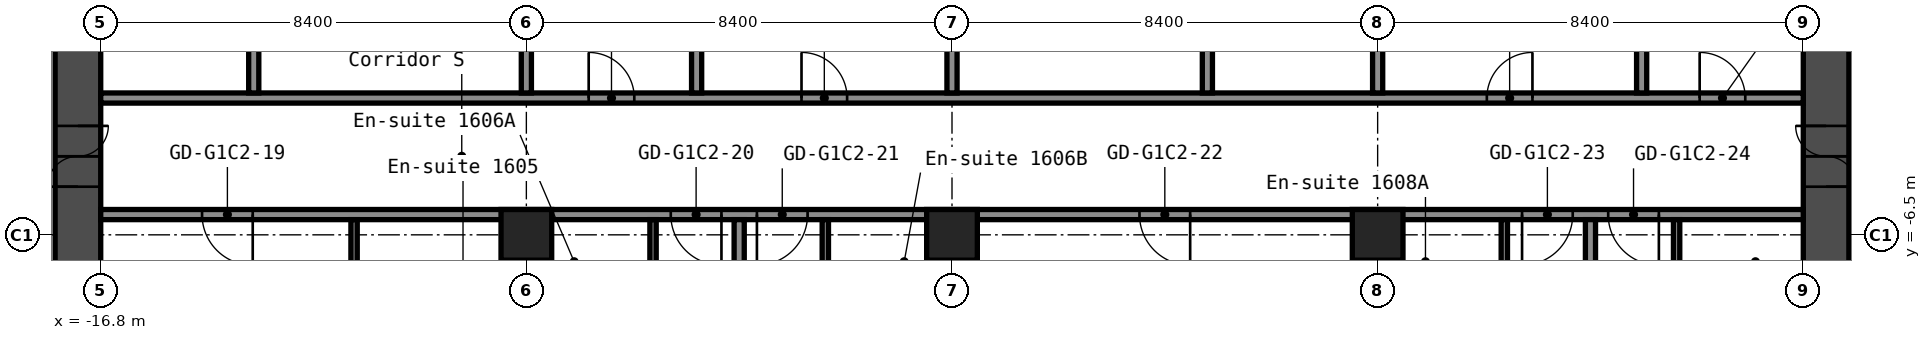
"""IFC4 building model, lengths in metres.
Left out: names, types, materials, properties, quantities, classifications, styles, units other than length and angle.
Written with IfcOpenShell. Run it as: python <this file> out.ifc"""

import sys

from ifc_helpers import new_model, si_unit, direction, frame, frame_2d, origin, origin_2d, place, context, subcontext, project, spatial, rectangle, hollow_rectangle, extrude, element, fill, save


model = new_model("IFC4")
c1 = context("Model", 3, precision=1e-05, world=origin(), true_north=direction((0.0, 1.0)))
c2 = subcontext(c1, "Body", "Model", "MODEL_VIEW")
j1 = project(units=[si_unit("LENGTHUNIT", "METRE"), si_unit("PLANEANGLEUNIT", "RADIAN")], contexts=[c1])
p1 = place(None, origin())
s1 = spatial("IfcSite", under=j1, at=p1, CompositionType="ELEMENT")
p2 = place(p1, origin())
s2 = spatial("IfcBuilding", under=s1, at=p2, CompositionType="ELEMENT")
p3 = place(p2, frame((0.0, 0.0, 58.2)))
s3 = spatial("IfcBuildingStorey", under=s2, at=p3, CompositionType="ELEMENT", Elevation=58.2)
for number, where, z_axis, x_axis in (
    (1, (-8.4, -6.5, 0.0), (0.0, 0.0, 1.0), (1.0, 0.0, 0.0)),
    (2, (0.0, -6.5, 0.0), (0.0, 0.0, 1.0), (1.0, 0.0, 0.0)),
    (3, (8.4, -6.5, 0.0), (0.0, 0.0, 1.0), (1.0, 0.0, 0.0)),
):
    element("IfcColumn", number, at=place(p3, frame(where, z_axis=z_axis, x_axis=x_axis)), inside=s3, PredefinedType="COLUMN", context=c2, shape_type="SweptSolid", body=[
        extrude(hollow_rectangle(XDim=1.0, YDim=1.0, WallThickness=0.04, at=origin_2d()), origin(), (0.0, 0.0, 1.0), 2.8),
    ])
p4 = place(p3, frame((-17.25, -8.4, 0.0), z_axis=(0.0, 0.0, 1.0), x_axis=(0.0, 1.0, 0.0)))
e4 = element("IfcWall", 4, at=p4, inside=s3, PredefinedType="SHEAR", context=c2, shape_type="SweptSolid", body=[
    extrude(rectangle(XDim=16.8, YDim=0.9, at=frame_2d((8.4, 0.0))), origin(), (0.0, 0.0, 1.0), 2.8),
])
p5 = place(p4, frame((12.75, 0.0, 0.0)))
e5 = element("IfcOpeningElement", 5, at=p5, cuts=e4, PredefinedType="OPENING", context=c2, shape_type="SweptSolid", body=[
    extrude(rectangle(XDim=1.2, YDim=2.1, at=frame_2d((0.6, 1.05))), frame((0.0, 0.46, 0.0), z_axis=(0.0, -1.0, 0.0), x_axis=(1.0, 0.0, 0.0)), (0.0, 0.0, 1.0), 0.92),
])
p6 = place(p4, frame((2.85, 0.0, 0.0)))
e6 = element("IfcOpeningElement", 6, at=p6, cuts=e4, PredefinedType="OPENING", context=c2, shape_type="SweptSolid", body=[
    extrude(rectangle(XDim=1.2, YDim=2.1, at=frame_2d((0.6, 1.05))), frame((0.0, 0.46, 0.0), z_axis=(0.0, -1.0, 0.0), x_axis=(1.0, 0.0, 0.0)), (0.0, 0.0, 1.0), 0.92),
])
p7 = place(p3, frame((17.25, -8.4, 0.0), z_axis=(0.0, 0.0, 1.0), x_axis=(0.0, 1.0, 0.0)))
e7 = element("IfcWall", 7, at=p7, inside=s3, PredefinedType="SHEAR", context=c2, shape_type="SweptSolid", body=[
    extrude(rectangle(XDim=16.8, YDim=0.9, at=frame_2d((8.4, 0.0))), origin(), (0.0, 0.0, 1.0), 2.8),
])
p8 = place(p7, frame((12.75, 0.0, 0.0)))
e8 = element("IfcOpeningElement", 8, at=p8, cuts=e7, PredefinedType="OPENING", context=c2, shape_type="SweptSolid", body=[
    extrude(rectangle(XDim=1.2, YDim=2.1, at=frame_2d((0.6, 1.05))), frame((0.0, 0.46, 0.0), z_axis=(0.0, -1.0, 0.0), x_axis=(1.0, 0.0, 0.0)), (0.0, 0.0, 1.0), 0.92),
])
p9 = place(p7, frame((2.85, 0.0, 0.0)))
e9 = element("IfcOpeningElement", 9, at=p9, cuts=e7, PredefinedType="OPENING", context=c2, shape_type="SweptSolid", body=[
    extrude(rectangle(XDim=1.2, YDim=2.1, at=frame_2d((0.6, 1.05))), frame((0.0, 0.46, 0.0), z_axis=(0.0, -1.0, 0.0), x_axis=(1.0, 0.0, 0.0)), (0.0, 0.0, 1.0), 0.92),
])
p10 = place(p3, frame((-16.8, -6.1, 0.0), z_axis=(0.0, 0.0, 1.0), x_axis=(1.0, 0.0, 0.0)))
e10 = element("IfcWall", 10, at=p10, inside=s3, PredefinedType="PARTITIONING", context=c2, shape_type="SweptSolid", body=[
    extrude(rectangle(XDim=33.6, YDim=0.2, at=frame_2d((16.8, 0.0))), origin(), (0.0, 0.0, 1.0), 2.8),
])
p11 = place(p10, frame((2.0, 0.0, 0.0)))
e11 = element("IfcOpeningElement", 11, at=p11, cuts=e10, PredefinedType="OPENING", context=c2, shape_type="SweptSolid", body=[
    extrude(rectangle(XDim=1.0, YDim=2.1, at=frame_2d((0.5, 1.05))), frame((0.0, 0.11, 0.0), z_axis=(0.0, -1.0, 0.0), x_axis=(1.0, 0.0, 0.0)), (0.0, 0.0, 1.0), 0.22),
])
p12 = place(p10, frame((11.25, 0.0, 0.0)))
e12 = element("IfcOpeningElement", 12, at=p12, cuts=e10, PredefinedType="OPENING", context=c2, shape_type="SweptSolid", body=[
    extrude(rectangle(XDim=1.0, YDim=2.1, at=frame_2d((0.5, 1.05))), frame((0.0, 0.11, 0.0), z_axis=(0.0, -1.0, 0.0), x_axis=(1.0, 0.0, 0.0)), (0.0, 0.0, 1.0), 0.22),
])
p13 = place(p10, frame((12.95, 0.0, 0.0)))
e13 = element("IfcOpeningElement", 13, at=p13, cuts=e10, PredefinedType="OPENING", context=c2, shape_type="SweptSolid", body=[
    extrude(rectangle(XDim=1.0, YDim=2.1, at=frame_2d((0.5, 1.05))), frame((0.0, 0.11, 0.0), z_axis=(0.0, -1.0, 0.0), x_axis=(1.0, 0.0, 0.0)), (0.0, 0.0, 1.0), 0.22),
])
p14 = place(p10, frame((20.5, 0.0, 0.0)))
e14 = element("IfcOpeningElement", 14, at=p14, cuts=e10, PredefinedType="OPENING", context=c2, shape_type="SweptSolid", body=[
    extrude(rectangle(XDim=1.0, YDim=2.1, at=frame_2d((0.5, 1.05))), frame((0.0, 0.11, 0.0), z_axis=(0.0, -1.0, 0.0), x_axis=(1.0, 0.0, 0.0)), (0.0, 0.0, 1.0), 0.22),
])
p15 = place(p10, frame((28.05, 0.0, 0.0)))
e15 = element("IfcOpeningElement", 15, at=p15, cuts=e10, PredefinedType="OPENING", context=c2, shape_type="SweptSolid", body=[
    extrude(rectangle(XDim=1.0, YDim=2.1, at=frame_2d((0.5, 1.05))), frame((0.0, 0.11, 0.0), z_axis=(0.0, -1.0, 0.0), x_axis=(1.0, 0.0, 0.0)), (0.0, 0.0, 1.0), 0.22),
])
p16 = place(p10, frame((29.75, 0.0, 0.0)))
e16 = element("IfcOpeningElement", 16, at=p16, cuts=e10, PredefinedType="OPENING", context=c2, shape_type="SweptSolid", body=[
    extrude(rectangle(XDim=1.0, YDim=2.1, at=frame_2d((0.5, 1.05))), frame((0.0, 0.11, 0.0), z_axis=(0.0, -1.0, 0.0), x_axis=(1.0, 0.0, 0.0)), (0.0, 0.0, 1.0), 0.22),
])
p17 = place(p3, frame((-16.8, -3.8, 0.0), z_axis=(0.0, 0.0, 1.0), x_axis=(1.0, 0.0, 0.0)))
e17 = element("IfcWall", 17, at=p17, inside=s3, PredefinedType="PARTITIONING", context=c2, shape_type="SweptSolid", body=[
    extrude(rectangle(XDim=33.6, YDim=0.2, at=frame_2d((16.8, 0.0))), origin(), (0.0, 0.0, 1.0), 2.8),
])
p18 = place(p17, frame((9.63, 0.0, 0.0)))
e18 = element("IfcOpeningElement", 18, at=p18, cuts=e17, PredefinedType="OPENING", context=c2, shape_type="SweptSolid", body=[
    extrude(rectangle(XDim=0.9, YDim=2.1, at=frame_2d((0.45, 1.05))), frame((0.0, 0.11, 0.0), z_axis=(0.0, -1.0, 0.0), x_axis=(1.0, 0.0, 0.0)), (0.0, 0.0, 1.0), 0.22),
])
p19 = place(p17, frame((13.83, 0.0, 0.0)))
e19 = element("IfcOpeningElement", 19, at=p19, cuts=e17, PredefinedType="OPENING", context=c2, shape_type="SweptSolid", body=[
    extrude(rectangle(XDim=0.9, YDim=2.1, at=frame_2d((0.45, 1.05))), frame((0.0, 0.11, 0.0), z_axis=(0.0, -1.0, 0.0), x_axis=(1.0, 0.0, 0.0)), (0.0, 0.0, 1.0), 0.22),
])
p20 = place(p17, frame((27.355, 0.0, 0.0)))
e20 = element("IfcOpeningElement", 20, at=p20, cuts=e17, PredefinedType="OPENING", context=c2, shape_type="SweptSolid", body=[
    extrude(rectangle(XDim=0.9, YDim=2.1, at=frame_2d((0.45, 1.05))), frame((0.0, 0.11, 0.0), z_axis=(0.0, -1.0, 0.0), x_axis=(1.0, 0.0, 0.0)), (0.0, 0.0, 1.0), 0.22),
])
p21 = place(p17, frame((31.555, 0.0, 0.0)))
e21 = element("IfcOpeningElement", 21, at=p21, cuts=e17, PredefinedType="OPENING", context=c2, shape_type="SweptSolid", body=[
    extrude(rectangle(XDim=0.9, YDim=2.1, at=frame_2d((0.45, 1.05))), frame((0.0, 0.11, 0.0), z_axis=(0.0, -1.0, 0.0), x_axis=(1.0, 0.0, 0.0)), (0.0, 0.0, 1.0), 0.22),
])
p22 = place(p3, frame((-13.78, -3.7, 0.0), z_axis=(0.0, 0.0, 1.0), x_axis=(0.0, 1.0, 0.0)))
e22 = element("IfcWall", 22, at=p22, inside=s3, PredefinedType="PARTITIONING", context=c2, shape_type="SweptSolid", body=[
    extrude(rectangle(XDim=7.4, YDim=0.2, at=frame_2d((3.7, 0.0))), origin(), (0.0, 0.0, 1.0), 2.8),
])
p23 = place(p3, frame((-11.8, -9.5, 0.0), z_axis=(0.0, 0.0, 1.0), x_axis=(0.0, 1.0, 0.0)))
e23 = element("IfcWall", 23, at=p23, inside=s3, PredefinedType="PARTITIONING", context=c2, shape_type="SweptSolid", body=[
    extrude(rectangle(XDim=3.3, YDim=0.125, at=frame_2d((1.65, 0.0))), origin(), (0.0, 0.0, 1.0), 2.8),
])
p24 = place(p3, frame((-8.4, -20.3, 0.0), z_axis=(0.0, 0.0, 1.0), x_axis=(0.0, 1.0, 0.0)))
e24 = element("IfcWall", 24, at=p24, inside=s3, PredefinedType="PARTITIONING", context=c2, shape_type="SweptSolid", body=[
    extrude(rectangle(XDim=13.31, YDim=0.2, at=frame_2d((6.655, 0.0))), origin(), (0.0, 0.0, 1.0), 2.8),
])
p25 = place(p3, frame((-8.4, -3.7, 0.0), z_axis=(0.0, 0.0, 1.0), x_axis=(0.0, 1.0, 0.0)))
e25 = element("IfcWall", 25, at=p25, inside=s3, PredefinedType="PARTITIONING", context=c2, shape_type="SweptSolid", body=[
    extrude(rectangle(XDim=7.4, YDim=0.2, at=frame_2d((3.7, 0.0))), origin(), (0.0, 0.0, 1.0), 2.8),
])
p26 = place(p3, frame((-5.9, -9.1, 0.0), z_axis=(0.0, 0.0, 1.0), x_axis=(0.0, 1.0, 0.0)))
e26 = element("IfcWall", 26, at=p26, inside=s3, PredefinedType="PARTITIONING", context=c2, shape_type="SweptSolid", body=[
    extrude(rectangle(XDim=2.9, YDim=0.125, at=frame_2d((1.45, 0.0))), origin(), (0.0, 0.0, 1.0), 2.8),
])
p27 = place(p26, frame((0.6, 0.0, 0.0)))
e27 = element("IfcOpeningElement", 27, at=p27, cuts=e26, PredefinedType="OPENING", context=c2, shape_type="SweptSolid", body=[
    extrude(rectangle(XDim=0.8, YDim=2.1, at=frame_2d((0.4, 1.05))), frame((0.0, 0.073, 0.0), z_axis=(0.0, -1.0, 0.0), x_axis=(1.0, 0.0, 0.0)), (0.0, 0.0, 1.0), 0.145),
])
p28 = place(p3, frame((-5.04, -3.7, 0.0), z_axis=(0.0, 0.0, 1.0), x_axis=(0.0, 1.0, 0.0)))
e28 = element("IfcWall", 28, at=p28, inside=s3, PredefinedType="PARTITIONING", context=c2, shape_type="SweptSolid", body=[
    extrude(rectangle(XDim=7.4, YDim=0.2, at=frame_2d((3.7, 0.0))), origin(), (0.0, 0.0, 1.0), 2.8),
])
p29 = place(p3, frame((-4.2, -20.3, 0.0), z_axis=(0.0, 0.0, 1.0), x_axis=(0.0, 1.0, 0.0)))
e29 = element("IfcWall", 29, at=p29, inside=s3, PredefinedType="PARTITIONING", context=c2, shape_type="SweptSolid", body=[
    extrude(rectangle(XDim=14.1, YDim=0.2, at=frame_2d((7.05, 0.0))), origin(), (0.0, 0.0, 1.0), 2.8),
])
p30 = place(p3, frame((-2.5, -9.1, 0.0), z_axis=(0.0, 0.0, 1.0), x_axis=(0.0, 1.0, 0.0)))
e30 = element("IfcWall", 30, at=p30, inside=s3, PredefinedType="PARTITIONING", context=c2, shape_type="SweptSolid", body=[
    extrude(rectangle(XDim=2.9, YDim=0.125, at=frame_2d((1.45, 0.0))), origin(), (0.0, 0.0, 1.0), 2.8),
])
p31 = place(p30, frame((0.6, 0.0, 0.0)))
e31 = element("IfcOpeningElement", 31, at=p31, cuts=e30, PredefinedType="OPENING", context=c2, shape_type="SweptSolid", body=[
    extrude(rectangle(XDim=0.8, YDim=2.1, at=frame_2d((0.4, 1.05))), frame((0.0, 0.073, 0.0), z_axis=(0.0, -1.0, 0.0), x_axis=(1.0, 0.0, 0.0)), (0.0, 0.0, 1.0), 0.145),
])
p32 = place(p3, frame((0.0, -20.3, 0.0), z_axis=(0.0, 0.0, 1.0), x_axis=(0.0, 1.0, 0.0)))
e32 = element("IfcWall", 32, at=p32, inside=s3, PredefinedType="PARTITIONING", context=c2, shape_type="SweptSolid", body=[
    extrude(rectangle(XDim=13.31, YDim=0.2, at=frame_2d((6.655, 0.0))), origin(), (0.0, 0.0, 1.0), 2.8),
])
for number, where, z_axis, x_axis in (
    (33, (0.0, -3.7, 0.0), (0.0, 0.0, 1.0), (0.0, 1.0, 0.0)),
    (34, (5.04, -3.7, 0.0), (0.0, 0.0, 1.0), (0.0, 1.0, 0.0)),
):
    element("IfcWall", number, at=place(p3, frame(where, z_axis=z_axis, x_axis=x_axis)), inside=s3, PredefinedType="PARTITIONING", context=c2, shape_type="SweptSolid", body=[
        extrude(rectangle(XDim=7.4, YDim=0.2, at=frame_2d((3.7, 0.0))), origin(), (0.0, 0.0, 1.0), 2.8),
    ])
p33 = place(p3, frame((8.4, -20.3, 0.0), z_axis=(0.0, 0.0, 1.0), x_axis=(0.0, 1.0, 0.0)))
e35 = element("IfcWall", 35, at=p33, inside=s3, PredefinedType="PARTITIONING", context=c2, shape_type="SweptSolid", body=[
    extrude(rectangle(XDim=13.31, YDim=0.2, at=frame_2d((6.655, 0.0))), origin(), (0.0, 0.0, 1.0), 2.8),
])
p34 = place(p3, frame((8.4, -3.7, 0.0), z_axis=(0.0, 0.0, 1.0), x_axis=(0.0, 1.0, 0.0)))
e36 = element("IfcWall", 36, at=p34, inside=s3, PredefinedType="PARTITIONING", context=c2, shape_type="SweptSolid", body=[
    extrude(rectangle(XDim=7.4, YDim=0.2, at=frame_2d((3.7, 0.0))), origin(), (0.0, 0.0, 1.0), 2.8),
])
p35 = place(p3, frame((10.9, -9.1, 0.0), z_axis=(0.0, 0.0, 1.0), x_axis=(0.0, 1.0, 0.0)))
e37 = element("IfcWall", 37, at=p35, inside=s3, PredefinedType="PARTITIONING", context=c2, shape_type="SweptSolid", body=[
    extrude(rectangle(XDim=2.9, YDim=0.125, at=frame_2d((1.45, 0.0))), origin(), (0.0, 0.0, 1.0), 2.8),
])
p36 = place(p35, frame((0.6, 0.0, 0.0)))
e38 = element("IfcOpeningElement", 38, at=p36, cuts=e37, PredefinedType="OPENING", context=c2, shape_type="SweptSolid", body=[
    extrude(rectangle(XDim=0.8, YDim=2.1, at=frame_2d((0.4, 1.05))), frame((0.0, 0.073, 0.0), z_axis=(0.0, -1.0, 0.0), x_axis=(1.0, 0.0, 0.0)), (0.0, 0.0, 1.0), 0.145),
])
p37 = place(p3, frame((12.6, -20.3, 0.0), z_axis=(0.0, 0.0, 1.0), x_axis=(0.0, 1.0, 0.0)))
e39 = element("IfcWall", 39, at=p37, inside=s3, PredefinedType="PARTITIONING", context=c2, shape_type="SweptSolid", body=[
    extrude(rectangle(XDim=14.1, YDim=0.2, at=frame_2d((7.05, 0.0))), origin(), (0.0, 0.0, 1.0), 2.8),
])
p38 = place(p3, frame((13.61, -3.7, 0.0), z_axis=(0.0, 0.0, 1.0), x_axis=(0.0, 1.0, 0.0)))
e40 = element("IfcWall", 40, at=p38, inside=s3, PredefinedType="PARTITIONING", context=c2, shape_type="SweptSolid", body=[
    extrude(rectangle(XDim=7.4, YDim=0.2, at=frame_2d((3.7, 0.0))), origin(), (0.0, 0.0, 1.0), 2.8),
])
p39 = place(p3, frame((14.3, -9.1, 0.0), z_axis=(0.0, 0.0, 1.0), x_axis=(0.0, 1.0, 0.0)))
e41 = element("IfcWall", 41, at=p39, inside=s3, PredefinedType="PARTITIONING", context=c2, shape_type="SweptSolid", body=[
    extrude(rectangle(XDim=2.9, YDim=0.125, at=frame_2d((1.45, 0.0))), origin(), (0.0, 0.0, 1.0), 2.8),
])
p40 = place(p39, frame((0.6, 0.0, 0.0)))
e42 = element("IfcOpeningElement", 42, at=p40, cuts=e41, PredefinedType="OPENING", context=c2, shape_type="SweptSolid", body=[
    extrude(rectangle(XDim=0.8, YDim=2.1, at=frame_2d((0.4, 1.05))), frame((0.0, 0.073, 0.0), z_axis=(0.0, -1.0, 0.0), x_axis=(1.0, 0.0, 0.0)), (0.0, 0.0, 1.0), 0.145),
])
p41 = place(p6, origin())
e43 = element("IfcDoor", 43, at=p41, inside=s3, OperationType="DOUBLE_DOOR_SINGLE_SWING", PredefinedType="DOOR", context=c2, shape_type="SweptSolid", body=[
    extrude(rectangle(XDim=1.2, YDim=2.1, at=frame_2d((0.6, 1.05))), frame((0.0, 0.025, 0.0), z_axis=(0.0, -1.0, 0.0), x_axis=(1.0, 0.0, 0.0)), (0.0, 0.0, 1.0), 0.05),
])
fill(e6, e43)
p42 = place(p9, origin())
e44 = element("IfcDoor", 44, at=p42, inside=s3, OperationType="DOUBLE_DOOR_SINGLE_SWING", PredefinedType="DOOR", context=c2, shape_type="SweptSolid", body=[
    extrude(rectangle(XDim=1.2, YDim=2.1, at=frame_2d((0.6, 1.05))), frame((0.0, 0.025, 0.0), z_axis=(0.0, -1.0, 0.0), x_axis=(1.0, 0.0, 0.0)), (0.0, 0.0, 1.0), 0.05),
])
fill(e9, e44)
p43 = place(p11, origin())
e45 = element("IfcDoor", 45, at=p43, inside=s3, OperationType="SINGLE_SWING_RIGHT", PredefinedType="DOOR", context=c2, shape_type="SweptSolid", body=[
    extrude(rectangle(XDim=1.0, YDim=2.1, at=frame_2d((0.5, 1.05))), frame((0.0, 0.025, 0.0), z_axis=(0.0, -1.0, 0.0), x_axis=(1.0, 0.0, 0.0)), (0.0, 0.0, 1.0), 0.05),
])
fill(e11, e45)
p44 = place(p12, origin())
e46 = element("IfcDoor", 46, at=p44, inside=s3, OperationType="SINGLE_SWING_RIGHT", PredefinedType="DOOR", context=c2, shape_type="SweptSolid", body=[
    extrude(rectangle(XDim=1.0, YDim=2.1, at=frame_2d((0.5, 1.05))), frame((0.0, 0.025, 0.0), z_axis=(0.0, -1.0, 0.0), x_axis=(1.0, 0.0, 0.0)), (0.0, 0.0, 1.0), 0.05),
])
fill(e12, e46)
p45 = place(p13, origin())
e47 = element("IfcDoor", 47, at=p45, inside=s3, OperationType="SINGLE_SWING_LEFT", PredefinedType="DOOR", context=c2, shape_type="SweptSolid", body=[
    extrude(rectangle(XDim=1.0, YDim=2.1, at=frame_2d((0.5, 1.05))), frame((0.0, 0.025, 0.0), z_axis=(0.0, -1.0, 0.0), x_axis=(1.0, 0.0, 0.0)), (0.0, 0.0, 1.0), 0.05),
])
fill(e13, e47)
p46 = place(p14, origin())
e48 = element("IfcDoor", 48, at=p46, inside=s3, OperationType="SINGLE_SWING_RIGHT", PredefinedType="DOOR", context=c2, shape_type="SweptSolid", body=[
    extrude(rectangle(XDim=1.0, YDim=2.1, at=frame_2d((0.5, 1.05))), frame((0.0, 0.025, 0.0), z_axis=(0.0, -1.0, 0.0), x_axis=(1.0, 0.0, 0.0)), (0.0, 0.0, 1.0), 0.05),
])
fill(e14, e48)
p47 = place(p15, origin())
e49 = element("IfcDoor", 49, at=p47, inside=s3, OperationType="SINGLE_SWING_LEFT", PredefinedType="DOOR", context=c2, shape_type="SweptSolid", body=[
    extrude(rectangle(XDim=1.0, YDim=2.1, at=frame_2d((0.5, 1.05))), frame((0.0, 0.025, 0.0), z_axis=(0.0, -1.0, 0.0), x_axis=(1.0, 0.0, 0.0)), (0.0, 0.0, 1.0), 0.05),
])
fill(e15, e49)
p48 = place(p16, origin())
e50 = element("IfcDoor", 50, at=p48, inside=s3, OperationType="SINGLE_SWING_RIGHT", PredefinedType="DOOR", context=c2, shape_type="SweptSolid", body=[
    extrude(rectangle(XDim=1.0, YDim=2.1, at=frame_2d((0.5, 1.05))), frame((0.0, 0.025, 0.0), z_axis=(0.0, -1.0, 0.0), x_axis=(1.0, 0.0, 0.0)), (0.0, 0.0, 1.0), 0.05),
])
fill(e16, e50)
p49 = place(p18, origin())
e51 = element("IfcDoor", 51, at=p49, inside=s3, OperationType="SINGLE_SWING_RIGHT", PredefinedType="DOOR", context=c2, shape_type="SweptSolid", body=[
    extrude(rectangle(XDim=0.9, YDim=2.1, at=frame_2d((0.45, 1.05))), frame((0.0, 0.025, 0.0), z_axis=(0.0, -1.0, 0.0), x_axis=(1.0, 0.0, 0.0)), (0.0, 0.0, 1.0), 0.05),
])
fill(e18, e51)
p50 = place(p19, origin())
e52 = element("IfcDoor", 52, at=p50, inside=s3, OperationType="SINGLE_SWING_RIGHT", PredefinedType="DOOR", context=c2, shape_type="SweptSolid", body=[
    extrude(rectangle(XDim=0.9, YDim=2.1, at=frame_2d((0.45, 1.05))), frame((0.0, 0.025, 0.0), z_axis=(0.0, -1.0, 0.0), x_axis=(1.0, 0.0, 0.0)), (0.0, 0.0, 1.0), 0.05),
])
fill(e19, e52)
p51 = place(p20, origin())
e53 = element("IfcDoor", 53, at=p51, inside=s3, OperationType="SINGLE_SWING_LEFT", PredefinedType="DOOR", context=c2, shape_type="SweptSolid", body=[
    extrude(rectangle(XDim=0.9, YDim=2.1, at=frame_2d((0.45, 1.05))), frame((0.0, 0.025, 0.0), z_axis=(0.0, -1.0, 0.0), x_axis=(1.0, 0.0, 0.0)), (0.0, 0.0, 1.0), 0.05),
])
fill(e20, e53)
p52 = place(p21, origin())
e54 = element("IfcDoor", 54, at=p52, inside=s3, OperationType="SINGLE_SWING_RIGHT", PredefinedType="DOOR", context=c2, shape_type="SweptSolid", body=[
    extrude(rectangle(XDim=0.9, YDim=2.1, at=frame_2d((0.45, 1.05))), frame((0.0, 0.025, 0.0), z_axis=(0.0, -1.0, 0.0), x_axis=(1.0, 0.0, 0.0)), (0.0, 0.0, 1.0), 0.05),
])
fill(e21, e54)
save(model, sys.argv[1])
